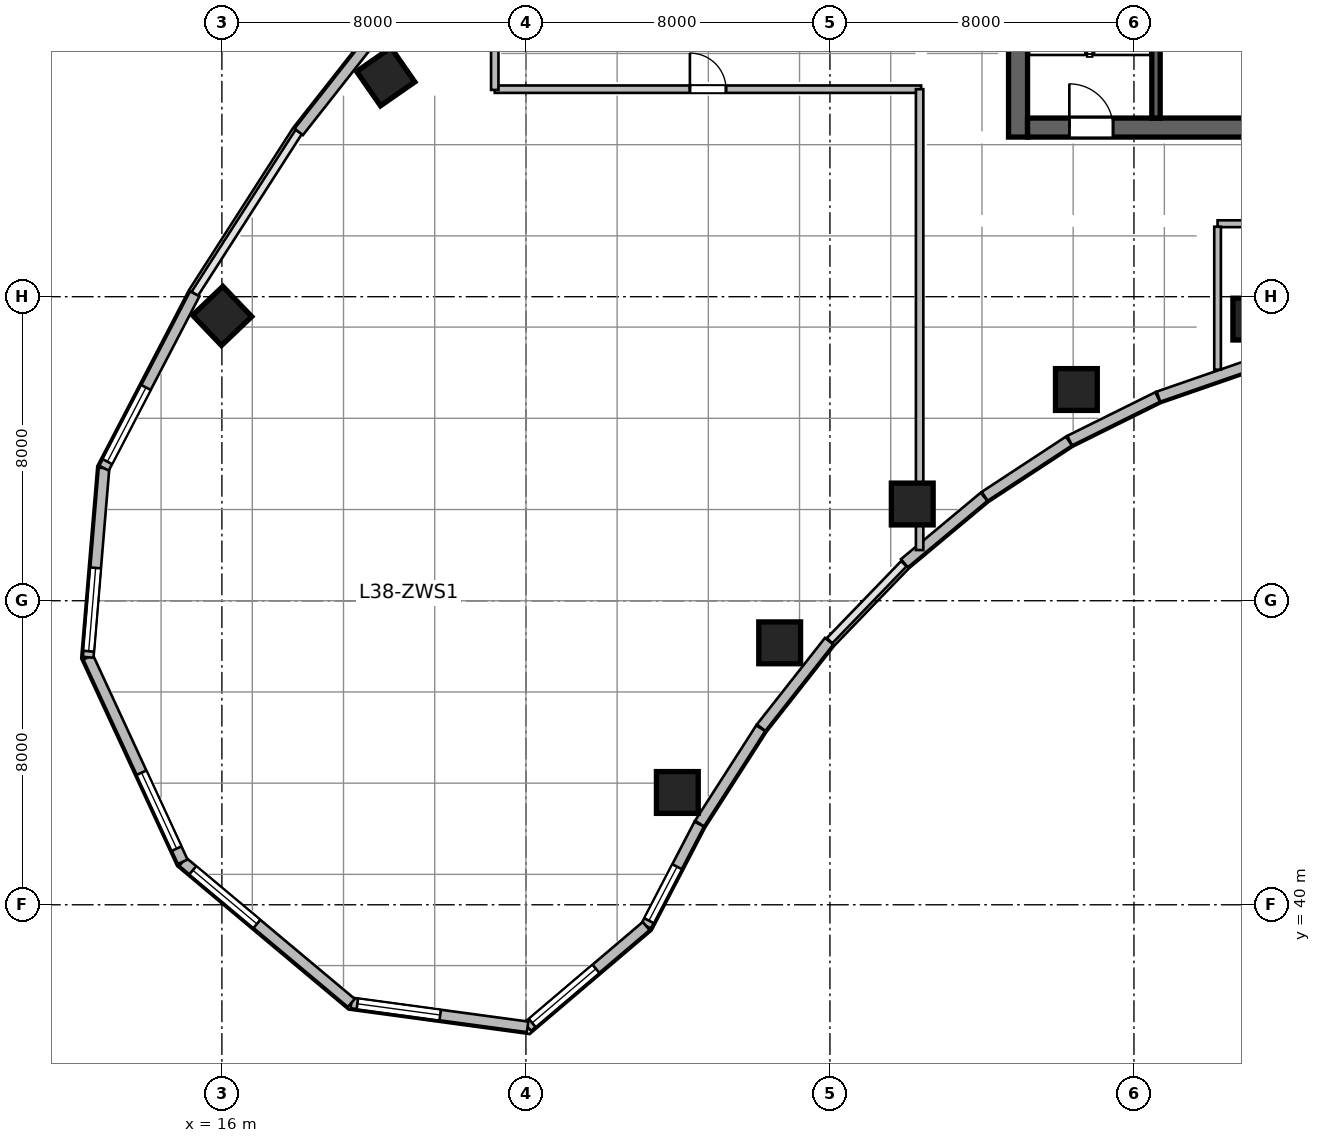
"""IFC4 building model, lengths in metres.
Left out: names, types, materials, properties, quantities, classifications, styles, units other than length and angle.
Written with IfcOpenShell. Run it as: python <this file> out.ifc"""

import sys

from ifc_helpers import new_model, si_unit, direction, frame, frame_2d, origin, origin_2d, place, context, subcontext, project, spatial, rectangle, circle, extrude, source, transform, mapped, element, fill, save


model = new_model("IFC4")
c1 = context("Model", 3, precision=1e-05, world=origin(), true_north=direction((0.0, 1.0)))
c2 = subcontext(c1, "Body", "Model", "MODEL_VIEW")
j1 = project(units=[si_unit("LENGTHUNIT", "METRE"), si_unit("PLANEANGLEUNIT", "RADIAN")], contexts=[c1])
p1 = place(None, origin())
s1 = spatial("IfcSite", under=j1, at=p1, CompositionType="ELEMENT")
p2 = place(p1, origin())
s2 = spatial("IfcBuilding", under=s1, at=p2, CompositionType="ELEMENT")
p3 = place(p2, frame((0.0, 0.0, 158.4)))
s3 = spatial("IfcBuildingStorey", under=s2, at=p3, CompositionType="ELEMENT", Elevation=158.4)
m1 = source(origin(), c2, "Body", "SweptSolid", [
    extrude(rectangle(XDim=12.0, YDim=0.5, at=frame_2d((6.0, 0.0))), origin(), (0.0, 0.0, 1.0), 3.9),
])
p4 = place(p3, frame((36.95, 60.2, 0.0), z_axis=(0.0, 0.0, 1.0), x_axis=(0.0, 1.0, 0.0)))
e1 = element("IfcWall", 1, at=p4, inside=s3, PredefinedType="SHEAR", context=c2, shape_type="MappedRepresentation", body=[
    mapped(m1, transform((0.0, 0.0, 0.0), scale=1.0)),
])
m2 = source(origin(), c2, "Body", "SweptSolid", [
    extrude(rectangle(XDim=21.6, YDim=0.5, at=frame_2d((10.8, 0.0))), origin(), (0.0, 0.0, 1.0), 3.9),
])
p5 = place(p3, frame((37.2, 60.45, 0.0), z_axis=(0.0, 0.0, 1.0), x_axis=(1.0, 0.0, 0.0)))
e2 = element("IfcWall", 2, at=p5, inside=s3, PredefinedType="SHEAR", context=c2, shape_type="MappedRepresentation", body=[
    mapped(m2, transform((0.0, 0.0, 0.0), scale=1.0)),
])
p6 = place(p5, frame((1.1, 0.0, 0.0)))
e3 = element("IfcOpeningElement", 3, at=p6, cuts=e2, PredefinedType="OPENING", context=c2, shape_type="SweptSolid", body=[
    extrude(rectangle(XDim=1.15, YDim=2.15, at=frame_2d((0.575, 1.075))), frame((0.0, 0.26, 0.0), z_axis=(0.0, -1.0, 0.0), x_axis=(1.0, 0.0, 0.0)), (0.0, 0.0, 1.0), 0.52),
])
p7 = place(p5, frame((19.5, 0.0, 0.0)))
e4 = element("IfcOpeningElement", 4, at=p7, cuts=e2, PredefinedType="OPENING", context=c2, shape_type="SweptSolid", body=[
    extrude(rectangle(XDim=0.9, YDim=2.1, at=frame_2d((0.45, 1.05))), frame((0.0, 0.26, 0.0), z_axis=(0.0, -1.0, 0.0), x_axis=(1.0, 0.0, 0.0)), (0.0, 0.0, 1.0), 0.52),
])
p8 = place(p5, frame((12.02, 0.0, 0.0)))
e5 = element("IfcOpeningElement", 5, at=p8, cuts=e2, PredefinedType="OPENING", context=c2, shape_type="SweptSolid", body=[
    extrude(rectangle(XDim=1.6, YDim=2.15, at=frame_2d((0.8, 1.075))), frame((0.0, 0.26, 0.0), z_axis=(0.0, -1.0, 0.0), x_axis=(1.0, 0.0, 0.0)), (0.0, 0.0, 1.0), 0.52),
])
m3 = source(origin(), c2, "Body", "SweptSolid", [
    extrude(rectangle(XDim=11.0, YDim=0.22, at=frame_2d((5.5, 0.0))), origin(), (0.0, 0.0, 1.0), 3.9),
])
p9 = place(p3, frame((40.58, 60.7, 0.0), z_axis=(0.0, 0.0, 1.0), x_axis=(0.0, 1.0, 0.0)))
e6 = element("IfcWall", 6, at=p9, inside=s3, PredefinedType="SHEAR", context=c2, shape_type="MappedRepresentation", body=[
    mapped(m3, transform((0.0, 0.0, 0.0), scale=1.0)),
])
m4 = source(origin(), c2, "Body", "SweptSolid", [
    extrude(circle(Radius=0.55, at=origin_2d()), origin(), (0.0, 0.0, 1.0), 3.9),
])
p10 = place(p3, frame((27.985, 42.955, 0.0), z_axis=(0.0, 0.0, 1.0), x_axis=(-0.690756218984, 0.723087716626, 0.0)))
e7 = element("IfcColumn", 7, at=p10, inside=s3, PredefinedType="COLUMN", context=c2, shape_type="MappedRepresentation", body=[
    mapped(m4, transform((0.0, 0.0, 0.0), scale=1.0)),
])
m5 = source(origin(), c2, "Body", "SweptSolid", [
    extrude(rectangle(XDim=1.1, YDim=1.1, at=origin_2d()), origin(), (0.0, 0.0, 1.0), 3.9),
])
p11 = place(p3, frame((16.007, 55.494, 0.0), z_axis=(0.0, 0.0, 1.0), x_axis=(-0.690756218984, 0.723087716626, 0.0)))
e8 = element("IfcColumn", 8, at=p11, inside=s3, PredefinedType="COLUMN", context=c2, shape_type="MappedRepresentation", body=[
    mapped(m5, transform((0.0, 0.0, 0.0), scale=1.0)),
])
p12 = place(p3, frame((30.677, 46.892, 0.0), z_axis=(0.0, 0.0, 1.0), x_axis=(-0.571143442153, 0.820850271661, 0.0)))
e9 = element("IfcColumn", 9, at=p12, inside=s3, PredefinedType="COLUMN", context=c2, shape_type="MappedRepresentation", body=[
    mapped(m4, transform((0.0, 0.0, 0.0), scale=1.0)),
])
p13 = place(p3, frame((20.311, 61.789, 0.0), z_axis=(0.0, 0.0, 1.0), x_axis=(-0.571143442153, 0.820850271661, 0.0)))
e10 = element("IfcColumn", 10, at=p13, inside=s3, PredefinedType="COLUMN", context=c2, shape_type="MappedRepresentation", body=[
    mapped(m5, transform((0.0, 0.0, 0.0), scale=1.0)),
])
for number, where, z_axis, x_axis in (
    (11, (34.166, 50.545, 0.0), (0.0, 0.0, 1.0), (-0.436, 0.9, 0.0)),
    (12, (38.485, 53.558, 0.0), (0.0, 0.0, 1.0), (-0.289, 0.957, 0.0)),
    (13, (43.154, 55.411, 0.0), (0.0, 0.0, 1.0), (-0.143, 0.99, 0.0)),
):
    element("IfcColumn", number, at=place(p3, frame(where, z_axis=z_axis, x_axis=x_axis)), inside=s3, PredefinedType="COLUMN", context=c2, shape_type="MappedRepresentation", body=[
        mapped(m4, transform((0.0, 0.0, 0.0), scale=1.0)),
    ])
m6 = source(origin(), c2, "Body", "SweptSolid", [
    extrude(rectangle(XDim=2.53, YDim=0.28, at=frame_2d((1.265, 0.0))), origin(), (0.0, 0.0, 1.0), 3.65),
])
p14 = place(p3, frame((43.035, 54.198, 0.0), z_axis=(0.0, 0.0, 1.0), x_axis=(-0.944872429646, -0.327438683872, 0.0)))
e14 = element("IfcWall", 14, at=p14, inside=s3, PredefinedType="SOLIDWALL", context=c2, shape_type="MappedRepresentation", body=[
    mapped(m6, transform((0.0, 0.0, 0.0), scale=1.0)),
])
m7 = source(origin(), c2, "Body", "SweptSolid", [
    extrude(rectangle(XDim=2.584, YDim=0.28, at=frame_2d((1.292, 0.0))), origin(), (0.0, 0.0, 1.0), 3.65),
])
p15 = place(p3, frame((40.624, 53.361, 0.0), z_axis=(0.0, 0.0, 1.0), x_axis=(-0.895989792847, -0.44407464588, 0.0)))
e15 = element("IfcWall", 15, at=p15, inside=s3, PredefinedType="SOLIDWALL", context=c2, shape_type="MappedRepresentation", body=[
    mapped(m7, transform((0.0, 0.0, 0.0), scale=1.0)),
])
m8 = source(origin(), c2, "Body", "SweptSolid", [
    extrude(rectangle(XDim=2.652, YDim=0.28, at=frame_2d((1.326, 0.0))), origin(), (0.0, 0.0, 1.0), 3.65),
])
p16 = place(p3, frame((38.289, 52.202, 0.0), z_axis=(0.0, 0.0, 1.0), x_axis=(-0.836008323535, -0.54871676025, 0.0)))
e16 = element("IfcWall", 16, at=p16, inside=s3, PredefinedType="SOLIDWALL", context=c2, shape_type="MappedRepresentation", body=[
    mapped(m8, transform((0.0, 0.0, 0.0), scale=1.0)),
])
m9 = source(origin(), c2, "Body", "SweptSolid", [
    extrude(rectangle(XDim=2.729, YDim=0.28, at=frame_2d((1.365, 0.0))), origin(), (0.0, 0.0, 1.0), 3.65),
])
p17 = place(p3, frame((36.055, 50.735, 0.0), z_axis=(0.0, 0.0, 1.0), x_axis=(-0.767957284255, -0.640501061326, 0.0)))
e17 = element("IfcWall", 17, at=p17, inside=s3, PredefinedType="SOLIDWALL", context=c2, shape_type="MappedRepresentation", body=[
    mapped(m9, transform((0.0, 0.0, 0.0), scale=1.0)),
])
m10 = source(origin(), c2, "Body", "SweptSolid", [
    extrude(rectangle(XDim=2.897, YDim=0.28, at=frame_2d((1.448, 0.0))), origin(), (0.0, 0.0, 1.0), 3.65),
])
p18 = place(p3, frame((31.979, 46.936, 0.0), z_axis=(0.0, 0.0, 1.0), x_axis=(-0.618167636915, -0.786046291685, 0.0)))
e18 = element("IfcWall", 18, at=p18, inside=s3, PredefinedType="SOLIDWALL", context=c2, shape_type="MappedRepresentation", body=[
    mapped(m10, transform((0.0, 0.0, 0.0), scale=1.0)),
])
m11 = source(origin(), c2, "Body", "SweptSolid", [
    extrude(rectangle(XDim=2.981, YDim=0.28, at=frame_2d((1.49, 0.0))), origin(), (0.0, 0.0, 1.0), 3.65),
])
p19 = place(p3, frame((30.179, 44.645, 0.0), z_axis=(0.0, 0.0, 1.0), x_axis=(-0.540194451908, -0.841540227278, 0.0)))
e19 = element("IfcWall", 19, at=p19, inside=s3, PredefinedType="SOLIDWALL", context=c2, shape_type="MappedRepresentation", body=[
    mapped(m11, transform((0.0, 0.0, 0.0), scale=1.0)),
])
m12 = source(origin(), c2, "Body", "SweptSolid", [
    extrude(rectangle(XDim=3.024, YDim=0.28, at=frame_2d((1.512, 0.0))), origin(), (0.0, 0.0, 1.0), 3.65),
])
p20 = place(p3, frame((28.561, 42.123, 0.0), z_axis=(0.0, 0.0, 1.0), x_axis=(-0.461718746531, -0.887026380161, 0.0)))
e20 = element("IfcWall", 20, at=p20, inside=s3, PredefinedType="SOLIDWALL", context=c2, shape_type="MappedRepresentation", body=[
    mapped(m12, transform((0.0, 0.0, 0.0), scale=1.0)),
])
p21 = place(p20, frame((1.264, 0.0, 0.95)))
e21 = element("IfcOpeningElement", 21, at=p21, cuts=e20, PredefinedType="OPENING", context=c2, shape_type="SweptSolid", body=[
    extrude(rectangle(XDim=1.6, YDim=1.9, at=frame_2d((0.8, 0.95))), frame((0.0, 0.15, 0.0), z_axis=(0.0, -1.0, 0.0), x_axis=(1.0, 0.0, 0.0)), (0.0, 0.0, 1.0), 0.3),
])
m13 = source(origin(), c2, "Body", "SweptSolid", [
    extrude(rectangle(XDim=4.096, YDim=0.28, at=frame_2d((2.048, 0.0))), origin(), (0.0, 0.0, 1.0), 3.65),
])
p22 = place(p3, frame((27.164, 39.44, 0.0), z_axis=(0.0, 0.0, 1.0), x_axis=(-0.761926081737, -0.647663991564, 0.0)))
e22 = element("IfcWall", 22, at=p22, inside=s3, PredefinedType="SOLIDWALL", context=c2, shape_type="MappedRepresentation", body=[
    mapped(m13, transform((0.0, 0.0, 0.0), scale=1.0)),
])
p23 = place(p22, frame((1.736, 0.0, 0.95)))
e23 = element("IfcOpeningElement", 23, at=p23, cuts=e22, PredefinedType="OPENING", context=c2, shape_type="SweptSolid", body=[
    extrude(rectangle(XDim=2.2, YDim=2.1, at=frame_2d((1.1, 1.05))), frame((0.0, 0.15, 0.0), z_axis=(0.0, -1.0, 0.0), x_axis=(1.0, 0.0, 0.0)), (0.0, 0.0, 1.0), 0.3),
])
m14 = source(origin(), c2, "Body", "SweptSolid", [
    extrude(rectangle(XDim=4.68, YDim=0.28, at=frame_2d((2.34, 0.0))), origin(), (0.0, 0.0, 1.0), 3.65),
])
p24 = place(p3, frame((24.043, 36.788, 0.0), z_axis=(0.0, 0.0, 1.0), x_axis=(-0.990931146435, 0.134370618162, 0.0)))
e24 = element("IfcWall", 24, at=p24, inside=s3, PredefinedType="SOLIDWALL", context=c2, shape_type="MappedRepresentation", body=[
    mapped(m14, transform((0.0, 0.0, 0.0), scale=1.0)),
])
p25 = place(p24, frame((2.32, 0.0, 0.95)))
e25 = element("IfcOpeningElement", 25, at=p25, cuts=e24, PredefinedType="OPENING", context=c2, shape_type="SweptSolid", body=[
    extrude(rectangle(XDim=2.2, YDim=2.1, at=frame_2d((1.1, 1.05))), frame((0.0, 0.15, 0.0), z_axis=(0.0, -1.0, 0.0), x_axis=(1.0, 0.0, 0.0)), (0.0, 0.0, 1.0), 0.3),
])
m15 = source(origin(), c2, "Body", "SweptSolid", [
    extrude(rectangle(XDim=5.786, YDim=0.28, at=frame_2d((2.893, 0.0))), origin(), (0.0, 0.0, 1.0), 3.65),
])
p26 = place(p3, frame((19.406, 37.417, 0.0), z_axis=(0.0, 0.0, 1.0), x_axis=(-0.766711306852, 0.641992034176, 0.0)))
e26 = element("IfcWall", 26, at=p26, inside=s3, PredefinedType="SOLIDWALL", context=c2, shape_type="MappedRepresentation", body=[
    mapped(m15, transform((0.0, 0.0, 0.0), scale=1.0)),
])
p27 = place(p26, frame((3.24, 0.0, 0.95)))
e27 = element("IfcOpeningElement", 27, at=p27, cuts=e26, PredefinedType="OPENING", context=c2, shape_type="SweptSolid", body=[
    extrude(rectangle(XDim=2.2, YDim=2.1, at=frame_2d((1.1, 1.05))), frame((0.0, 0.15, 0.0), z_axis=(0.0, -1.0, 0.0), x_axis=(1.0, 0.0, 0.0)), (0.0, 0.0, 1.0), 0.3),
])
m16 = source(origin(), c2, "Body", "SweptSolid", [
    extrude(rectangle(XDim=5.927, YDim=0.28, at=frame_2d((2.964, 0.0))), origin(), (0.0, 0.0, 1.0), 3.65),
])
p28 = place(p3, frame((14.969, 41.131, 0.0), z_axis=(0.0, 0.0, 1.0), x_axis=(-0.419656204795, 0.907683132914, 0.0)))
e28 = element("IfcWall", 28, at=p28, inside=s3, PredefinedType="SOLIDWALL", context=c2, shape_type="MappedRepresentation", body=[
    mapped(m16, transform((0.0, 0.0, 0.0), scale=1.0)),
])
p29 = place(p28, frame((0.382, 0.0, 0.95)))
e29 = element("IfcOpeningElement", 29, at=p29, cuts=e28, PredefinedType="OPENING", context=c2, shape_type="SweptSolid", body=[
    extrude(rectangle(XDim=2.2, YDim=2.1, at=frame_2d((1.1, 1.05))), frame((0.0, 0.15, 0.0), z_axis=(0.0, -1.0, 0.0), x_axis=(1.0, 0.0, 0.0)), (0.0, 0.0, 1.0), 0.3),
])
m17 = source(origin(), c2, "Body", "SweptSolid", [
    extrude(rectangle(XDim=4.994, YDim=0.28, at=frame_2d((2.497, 0.0))), origin(), (0.0, 0.0, 1.0), 3.65),
])
p30 = place(p3, frame((12.481, 46.512, 0.0), z_axis=(0.0, 0.0, 1.0), x_axis=(0.083344839916, 0.996520766296, 0.0)))
e30 = element("IfcWall", 30, at=p30, inside=s3, PredefinedType="SOLIDWALL", context=c2, shape_type="MappedRepresentation", body=[
    mapped(m17, transform((0.0, 0.0, 0.0), scale=1.0)),
])
p31 = place(p30, frame((0.16, 0.0, 0.95)))
e31 = element("IfcOpeningElement", 31, at=p31, cuts=e30, PredefinedType="OPENING", context=c2, shape_type="SweptSolid", body=[
    extrude(rectangle(XDim=2.2, YDim=2.1, at=frame_2d((1.1, 1.05))), frame((0.0, 0.15, 0.0), z_axis=(0.0, -1.0, 0.0), x_axis=(1.0, 0.0, 0.0)), (0.0, 0.0, 1.0), 0.3),
])
m18 = source(origin(), c2, "Body", "SweptSolid", [
    extrude(rectangle(XDim=5.171, YDim=0.28, at=frame_2d((2.585, 0.0))), origin(), (0.0, 0.0, 1.0), 3.65),
])
p32 = place(p3, frame((12.898, 51.489, 0.0), z_axis=(0.0, 0.0, 1.0), x_axis=(0.461752581363, 0.887008767491, 0.0)))
e32 = element("IfcWall", 32, at=p32, inside=s3, PredefinedType="SOLIDWALL", context=c2, shape_type="MappedRepresentation", body=[
    mapped(m18, transform((0.0, 0.0, 0.0), scale=1.0)),
])
p33 = place(p32, frame((0.193, 0.0, 0.95)))
e33 = element("IfcOpeningElement", 33, at=p33, cuts=e32, PredefinedType="OPENING", context=c2, shape_type="SweptSolid", body=[
    extrude(rectangle(XDim=2.2, YDim=2.1, at=frame_2d((1.1, 1.05))), frame((0.0, 0.15, 0.0), z_axis=(0.0, -1.0, 0.0), x_axis=(1.0, 0.0, 0.0)), (0.0, 0.0, 1.0), 0.3),
])
m19 = source(origin(), c2, "Body", "SweptSolid", [
    extrude(rectangle(XDim=4.922, YDim=0.28, at=frame_2d((2.461, 0.0))), origin(), (0.0, 0.0, 1.0), 3.65),
])
p34 = place(p3, frame((18.021, 60.338, 0.0), z_axis=(0.0, 0.0, 1.0), x_axis=(0.61817639101, 0.786039407153, 0.0)))
e34 = element("IfcWall", 34, at=p34, inside=s3, PredefinedType="SOLIDWALL", context=c2, shape_type="MappedRepresentation", body=[
    mapped(m19, transform((0.0, 0.0, 0.0), scale=1.0)),
])
m20 = source(origin(), c2, "Body", "SweptSolid", [
    extrude(rectangle(XDim=4.176, YDim=0.18, at=frame_2d((2.088, 0.0))), origin(), (0.0, 0.0, 1.0), 3.65),
])
p35 = place(p3, frame((42.2, 57.92, 0.0), z_axis=(0.0, 0.0, 1.0), x_axis=(1.0, 0.0, 0.0)))
e35 = element("IfcWall", 35, at=p35, inside=s3, PredefinedType="PLUMBINGWALL", context=c2, shape_type="MappedRepresentation", body=[
    mapped(m20, transform((0.0, 0.0, 0.0), scale=1.0)),
])
p36 = place(p35, frame((1.638, 0.0, 0.0)))
e36 = element("IfcOpeningElement", 36, at=p36, cuts=e35, PredefinedType="OPENING", context=c2, shape_type="SweptSolid", body=[
    extrude(rectangle(XDim=0.9, YDim=2.08, at=frame_2d((0.45, 1.04))), frame((0.0, 0.1, 0.0), z_axis=(0.0, -1.0, 0.0), x_axis=(1.0, 0.0, 0.0)), (0.0, 0.0, 1.0), 0.2),
])
m21 = source(origin(), c2, "Body", "SweptSolid", [
    extrude(rectangle(XDim=3.763, YDim=0.175, at=frame_2d((1.881, 0.0))), origin(), (0.0, 0.0, 1.0), 3.65),
])
p37 = place(p3, frame((42.2, 54.079, 0.0), z_axis=(0.0, 0.0, 1.0), x_axis=(0.0, 1.0, 0.0)))
e37 = element("IfcWall", 37, at=p37, inside=s3, PredefinedType="PARTITIONING", context=c2, shape_type="MappedRepresentation", body=[
    mapped(m21, transform((0.0, 0.0, 0.0), scale=1.0)),
])
m22 = source(origin(), c2, "Body", "SweptSolid", [
    extrude(rectangle(XDim=11.22, YDim=0.195, at=frame_2d((5.61, 0.0))), origin(), (0.0, 0.0, 1.0), 3.65),
])
p38 = place(p3, frame((23.18, 61.46, 0.0), z_axis=(0.0, 0.0, 1.0), x_axis=(1.0, 0.0, 0.0)))
e38 = element("IfcWall", 38, at=p38, inside=s3, PredefinedType="PARTITIONING", context=c2, shape_type="MappedRepresentation", body=[
    mapped(m22, transform((0.0, 0.0, 0.0), scale=1.0)),
])
p39 = place(p38, frame((5.135, 0.0, 0.0)))
e39 = element("IfcOpeningElement", 39, at=p39, cuts=e38, PredefinedType="OPENING", context=c2, shape_type="SweptSolid", body=[
    extrude(rectangle(XDim=0.95, YDim=2.1, at=frame_2d((0.475, 1.05))), frame((0.0, 0.107, 0.0), z_axis=(0.0, -1.0, 0.0), x_axis=(1.0, 0.0, 0.0)), (0.0, 0.0, 1.0), 0.215),
])
m23 = source(origin(), c2, "Body", "SweptSolid", [
    extrude(rectangle(XDim=12.126, YDim=0.195, at=frame_2d((6.063, 0.0))), origin(), (0.0, 0.0, 1.0), 3.65),
])
p40 = place(p3, frame((34.36, 49.334, 0.0), z_axis=(0.0, 0.0, 1.0), x_axis=(0.0, 1.0, 0.0)))
e40 = element("IfcWall", 40, at=p40, inside=s3, PredefinedType="PARTITIONING", context=c2, shape_type="MappedRepresentation", body=[
    mapped(m23, transform((0.0, 0.0, 0.0), scale=1.0)),
])
m24 = source(origin(), c2, "Body", "SweptSolid", [
    extrude(rectangle(XDim=2.62, YDim=0.195, at=frame_2d((1.31, 0.0))), origin(), (0.0, 0.0, 1.0), 3.65),
])
p41 = place(p3, frame((23.18, 61.44, 0.0), z_axis=(0.0, 0.0, 1.0), x_axis=(0.0, 1.0, 0.0)))
e41 = element("IfcWall", 41, at=p41, inside=s3, PredefinedType="PARTITIONING", context=c2, shape_type="MappedRepresentation", body=[
    mapped(m24, transform((0.0, 0.0, 0.0), scale=1.0)),
])
m25 = source(origin(), c2, "Body", "SweptSolid", [
    extrude(rectangle(XDim=1.6, YDim=1.9, at=frame_2d((0.8, 0.95))), frame((0.0, 0.03, 0.0), z_axis=(0.0, -1.0, 0.0), x_axis=(1.0, 0.0, 0.0)), (0.0, 0.0, 1.0), 0.06),
])
p42 = place(p21, origin())
e42 = element("IfcWindow", 42, at=p42, inside=s3, PartitioningType="SINGLE_PANEL", PredefinedType="WINDOW", context=c2, shape_type="MappedRepresentation", body=[
    mapped(m25, transform((0.0, 0.0, 0.0), scale=1.0)),
])
fill(e21, e42)
m26 = source(origin(), c2, "Body", "SweptSolid", [
    extrude(rectangle(XDim=2.2, YDim=2.1, at=frame_2d((1.1, 1.05))), frame((0.0, 0.03, 0.0), z_axis=(0.0, -1.0, 0.0), x_axis=(1.0, 0.0, 0.0)), (0.0, 0.0, 1.0), 0.06),
])
p43 = place(p23, origin())
e43 = element("IfcWindow", 43, at=p43, inside=s3, PartitioningType="TRIPLE_PANEL_VERTICAL", PredefinedType="WINDOW", context=c2, shape_type="MappedRepresentation", body=[
    mapped(m26, transform((0.0, 0.0, 0.0), scale=1.0)),
])
fill(e23, e43)
p44 = place(p25, origin())
e44 = element("IfcWindow", 44, at=p44, inside=s3, PartitioningType="TRIPLE_PANEL_VERTICAL", PredefinedType="WINDOW", context=c2, shape_type="MappedRepresentation", body=[
    mapped(m26, transform((0.0, 0.0, 0.0), scale=1.0)),
])
fill(e25, e44)
p45 = place(p27, origin())
e45 = element("IfcWindow", 45, at=p45, inside=s3, PartitioningType="TRIPLE_PANEL_VERTICAL", PredefinedType="WINDOW", context=c2, shape_type="MappedRepresentation", body=[
    mapped(m26, transform((0.0, 0.0, 0.0), scale=1.0)),
])
fill(e27, e45)
p46 = place(p29, origin())
e46 = element("IfcWindow", 46, at=p46, inside=s3, PartitioningType="TRIPLE_PANEL_VERTICAL", PredefinedType="WINDOW", context=c2, shape_type="MappedRepresentation", body=[
    mapped(m26, transform((0.0, 0.0, 0.0), scale=1.0)),
])
fill(e29, e46)
p47 = place(p31, origin())
e47 = element("IfcWindow", 47, at=p47, inside=s3, PartitioningType="TRIPLE_PANEL_VERTICAL", PredefinedType="WINDOW", context=c2, shape_type="MappedRepresentation", body=[
    mapped(m26, transform((0.0, 0.0, 0.0), scale=1.0)),
])
fill(e31, e47)
p48 = place(p33, origin())
e48 = element("IfcWindow", 48, at=p48, inside=s3, PartitioningType="TRIPLE_PANEL_VERTICAL", PredefinedType="WINDOW", context=c2, shape_type="MappedRepresentation", body=[
    mapped(m26, transform((0.0, 0.0, 0.0), scale=1.0)),
])
fill(e33, e48)
m27 = source(origin(), c2, "Body", "SweptSolid", [
    extrude(rectangle(XDim=1.15, YDim=2.15, at=frame_2d((0.575, 1.075))), frame((0.0, 0.025, 0.0), z_axis=(0.0, -1.0, 0.0), x_axis=(1.0, 0.0, 0.0)), (0.0, 0.0, 1.0), 0.05),
])
p49 = place(p6, origin())
e49 = element("IfcDoor", 49, at=p49, inside=s3, OperationType="SINGLE_SWING_LEFT", PredefinedType="DOOR", context=c2, shape_type="MappedRepresentation", body=[
    mapped(m27, transform((0.0, 0.0, 0.0), scale=1.0)),
])
fill(e3, e49)
m28 = source(origin(), c2, "Body", "SweptSolid", [
    extrude(rectangle(XDim=0.95, YDim=2.1, at=frame_2d((0.475, 1.05))), frame((0.0, 0.025, 0.0), z_axis=(0.0, -1.0, 0.0), x_axis=(1.0, 0.0, 0.0)), (0.0, 0.0, 1.0), 0.05),
])
p50 = place(p39, origin())
e50 = element("IfcDoor", 50, at=p50, inside=s3, OperationType="SINGLE_SWING_LEFT", PredefinedType="DOOR", context=c2, shape_type="MappedRepresentation", body=[
    mapped(m28, transform((0.0, 0.0, 0.0), scale=1.0)),
])
fill(e39, e50)
save(model, sys.argv[1])
